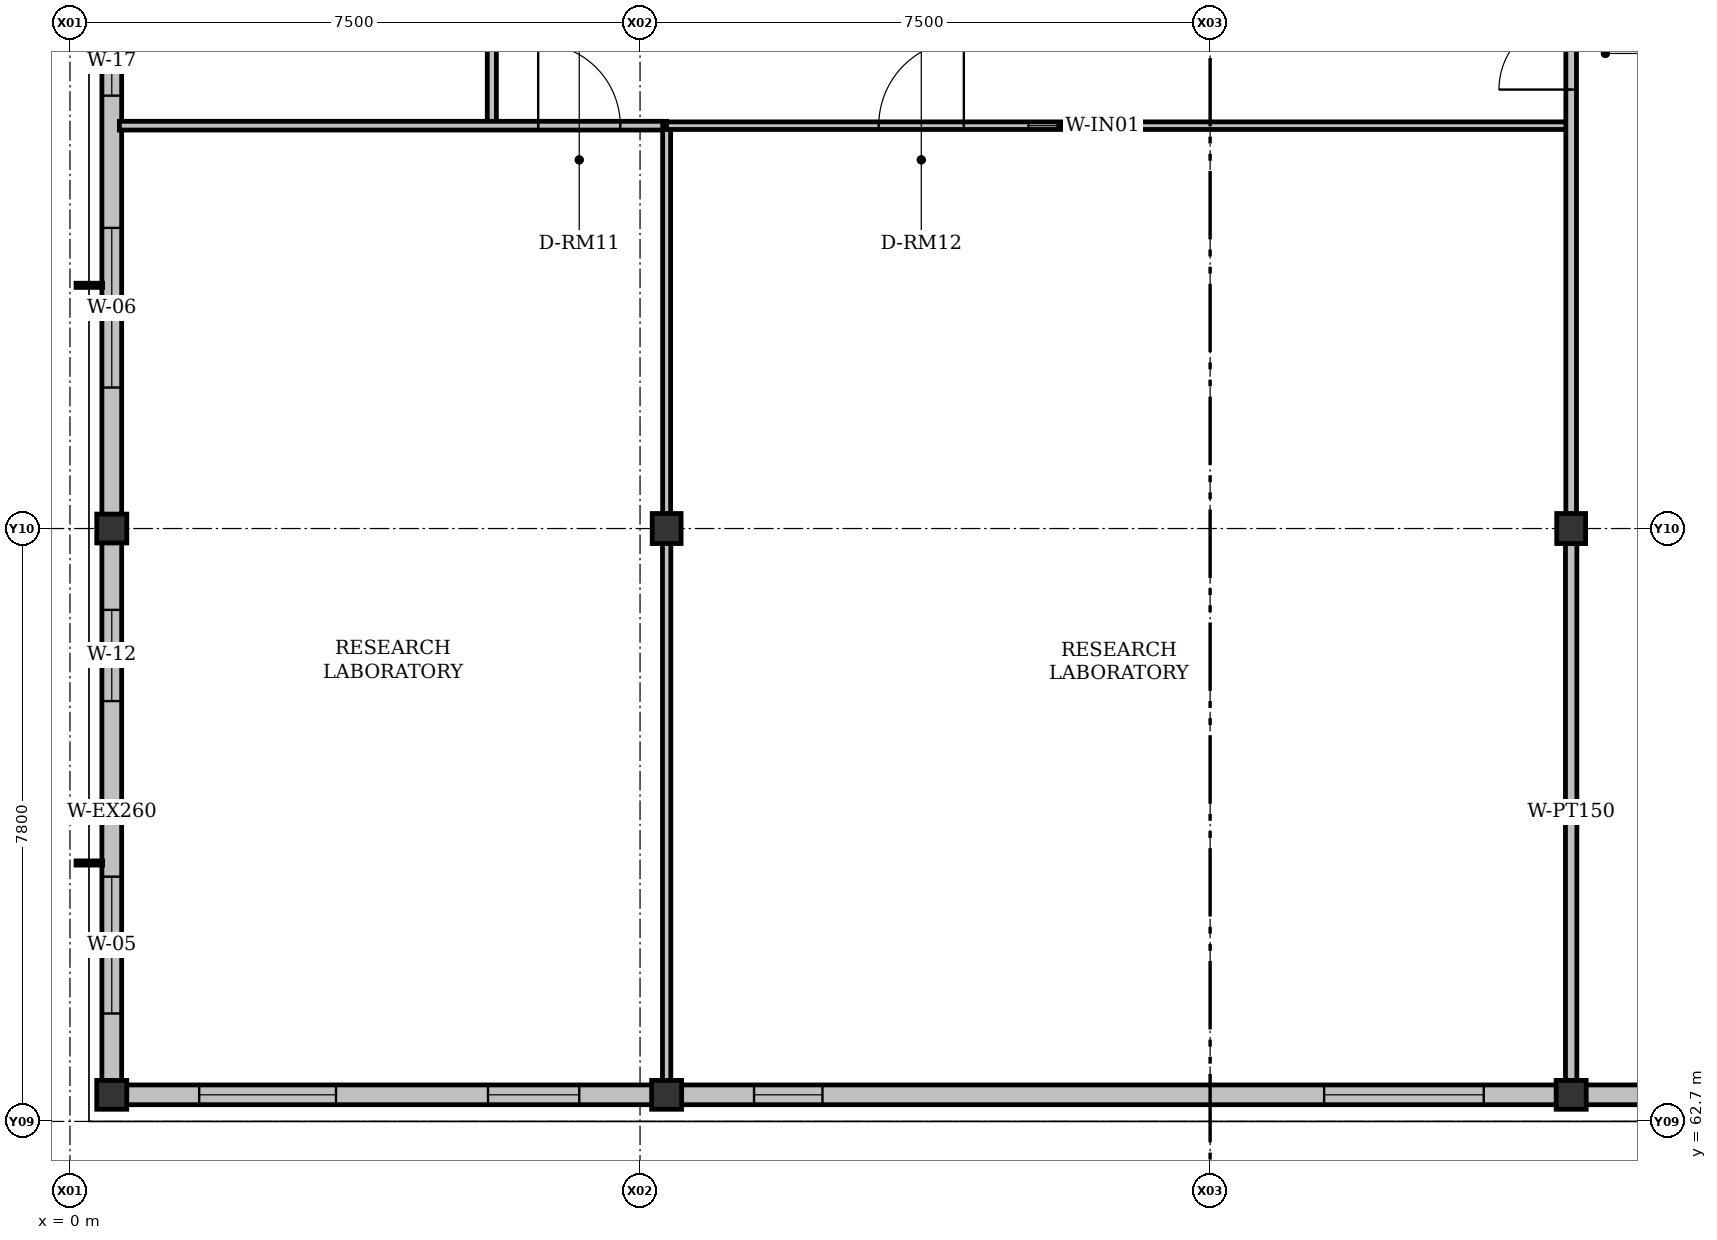
"""IFC4 building model, lengths in metres.
Left out: names, types, materials, properties, quantities, classifications, styles, units other than length and angle.
Written with IfcOpenShell. Run it as: python <this file> out.ifc"""

import sys

from ifc_helpers import new_model, si_unit, direction, frame, frame_2d, origin, origin_2d, place, context, subcontext, project, spatial, rectangle, i_section, extrude, element, fill, save


model = new_model("IFC4")
c1 = context("Model", 3, precision=1e-05, world=origin(), true_north=direction((0.0, 1.0)))
c2 = subcontext(c1, "Body", "Model", "MODEL_VIEW")
j1 = project(units=[si_unit("LENGTHUNIT", "METRE"), si_unit("PLANEANGLEUNIT", "RADIAN")], contexts=[c1])
p1 = place(None, origin())
s1 = spatial("IfcSite", under=j1, at=p1, CompositionType="ELEMENT")
p2 = place(p1, origin())
s2 = spatial("IfcBuilding", under=s1, at=p2, CompositionType="ELEMENT")
p3 = place(p2, frame((0.0, 0.0, 18.3)))
s3 = spatial("IfcBuildingStorey", under=s2, at=p3, CompositionType="ELEMENT", Elevation=18.3)
for number, where, z_axis, x_axis in (
    (1, (0.55, 63.05, 0.0), (0.0, 0.0, 1.0), (1.0, 0.0, 0.0)),
    (2, (7.85, 63.05, 0.0), (0.0, 0.0, 1.0), (1.0, 0.0, 0.0)),
    (3, (19.75, 63.05, 0.0), (0.0, 0.0, 1.0), (1.0, 0.0, 0.0)),
    (4, (0.55, 70.5, 0.0), (0.0, 0.0, 1.0), (1.0, 0.0, 0.0)),
    (5, (7.85, 70.5, 0.0), (0.0, 0.0, 1.0), (0.0, 1.0, 0.0)),
    (6, (19.75, 70.5, 0.0), (0.0, 0.0, 1.0), (0.0, 1.0, 0.0)),
):
    element("IfcColumn", number, at=place(p3, frame(where, z_axis=z_axis, x_axis=x_axis)), inside=s3, PredefinedType="COLUMN", context=c2, shape_type="SweptSolid", body=[
        extrude(i_section(OverallWidth=0.395, OverallDepth=0.38, WebThickness=0.019, FlangeThickness=0.03, FilletRadius=0.015, at=origin_2d()), origin(), (0.0, 0.0, 1.0), 4.2),
    ])
p4 = place(p3, frame((0.55, 63.05, 0.0), z_axis=(0.0, 0.0, 1.0), x_axis=(0.0, 1.0, 0.0)))
e7 = element("IfcWall", 7, at=p4, inside=s3, PredefinedType="SOLIDWALL", context=c2, shape_type="SweptSolid", body=[
    extrude(rectangle(XDim=7.45, YDim=0.26, at=frame_2d((3.725, 0.0))), origin(), (0.0, 0.0, 1.0), 3.577),
])
p5 = place(p4, frame((1.07, 0.0, 0.92)))
e8 = element("IfcOpeningElement", 8, at=p5, cuts=e7, PredefinedType="OPENING", context=c2, shape_type="SweptSolid", body=[
    extrude(rectangle(XDim=1.8, YDim=1.4, at=frame_2d((0.9, 0.7))), frame((0.0, 0.13, 0.0), z_axis=(0.0, -1.0, 0.0), x_axis=(1.0, 0.0, 0.0)), (0.0, 0.0, 1.0), 0.26),
])
p6 = place(p4, frame((5.18, 0.0, 0.92)))
e9 = element("IfcOpeningElement", 9, at=p6, cuts=e7, PredefinedType="OPENING", context=c2, shape_type="SweptSolid", body=[
    extrude(rectangle(XDim=1.2, YDim=1.7, at=frame_2d((0.6, 0.85))), frame((0.0, 0.13, 0.0), z_axis=(0.0, -1.0, 0.0), x_axis=(1.0, 0.0, 0.0)), (0.0, 0.0, 1.0), 0.26),
])
p7 = place(p3, frame((0.55, 70.5, 0.0), z_axis=(0.0, 0.0, 1.0), x_axis=(0.0, 1.0, 0.0)))
e10 = element("IfcWall", 10, at=p7, inside=s3, PredefinedType="SOLIDWALL", context=c2, shape_type="SweptSolid", body=[
    extrude(rectangle(XDim=7.5, YDim=0.26, at=frame_2d((3.75, 0.0))), origin(), (0.0, 0.0, 1.0), 3.577),
])
p8 = place(p7, frame((1.855, 0.0, 0.92)))
e11 = element("IfcOpeningElement", 11, at=p8, cuts=e10, PredefinedType="OPENING", context=c2, shape_type="SweptSolid", body=[
    extrude(rectangle(XDim=2.1, YDim=1.4, at=frame_2d((1.05, 0.7))), frame((0.0, 0.13, 0.0), z_axis=(0.0, -1.0, 0.0), x_axis=(1.0, 0.0, 0.0)), (0.0, 0.0, 1.0), 0.26),
])
p9 = place(p7, frame((5.695, 0.0, 0.92)))
e12 = element("IfcOpeningElement", 12, at=p9, cuts=e10, PredefinedType="OPENING", context=c2, shape_type="SweptSolid", body=[
    extrude(rectangle(XDim=0.9, YDim=1.3, at=frame_2d((0.45, 0.65))), frame((0.0, 0.13, 0.0), z_axis=(0.0, -1.0, 0.0), x_axis=(1.0, 0.0, 0.0)), (0.0, 0.0, 1.0), 0.26),
])
p10 = place(p3, frame((7.85, 63.05, 0.0), z_axis=(0.0, 0.0, 1.0), x_axis=(-1.0, 0.0, 0.0)))
e13 = element("IfcWall", 13, at=p10, inside=s3, PredefinedType="SOLIDWALL", context=c2, shape_type="SweptSolid", body=[
    extrude(rectangle(XDim=7.3, YDim=0.26, at=frame_2d((3.65, 0.0))), origin(), (0.0, 0.0, 1.0), 3.577),
])
p11 = place(p10, frame((1.15, 0.0, 0.92)))
e14 = element("IfcOpeningElement", 14, at=p11, cuts=e13, PredefinedType="OPENING", context=c2, shape_type="SweptSolid", body=[
    extrude(rectangle(XDim=1.2, YDim=1.55, at=frame_2d((0.6, 0.775))), frame((0.0, 0.13, 0.0), z_axis=(0.0, -1.0, 0.0), x_axis=(1.0, 0.0, 0.0)), (0.0, 0.0, 1.0), 0.26),
])
p12 = place(p10, frame((4.35, 0.0, 0.92)))
e15 = element("IfcOpeningElement", 15, at=p12, cuts=e13, PredefinedType="OPENING", context=c2, shape_type="SweptSolid", body=[
    extrude(rectangle(XDim=1.8, YDim=1.7, at=frame_2d((0.9, 0.85))), frame((0.0, 0.13, 0.0), z_axis=(0.0, -1.0, 0.0), x_axis=(1.0, 0.0, 0.0)), (0.0, 0.0, 1.0), 0.26),
])
p13 = place(p3, frame((19.75, 63.05, 0.0), z_axis=(0.0, 0.0, 1.0), x_axis=(-1.0, 0.0, 0.0)))
e16 = element("IfcWall", 16, at=p13, inside=s3, PredefinedType="SOLIDWALL", context=c2, shape_type="SweptSolid", body=[
    extrude(rectangle(XDim=11.9, YDim=0.26, at=frame_2d((5.95, 0.0))), origin(), (0.0, 0.0, 1.0), 3.577),
])
p14 = place(p13, frame((1.15, 0.0, 0.92)))
e17 = element("IfcOpeningElement", 17, at=p14, cuts=e16, PredefinedType="OPENING", context=c2, shape_type="SweptSolid", body=[
    extrude(rectangle(XDim=2.1, YDim=1.55, at=frame_2d((1.05, 0.775))), frame((0.0, 0.13, 0.0), z_axis=(0.0, -1.0, 0.0), x_axis=(1.0, 0.0, 0.0)), (0.0, 0.0, 1.0), 0.26),
])
p15 = place(p13, frame((9.85, 0.0, 0.92)))
e18 = element("IfcOpeningElement", 18, at=p15, cuts=e16, PredefinedType="OPENING", context=c2, shape_type="SweptSolid", body=[
    extrude(rectangle(XDim=0.9, YDim=1.3, at=frame_2d((0.45, 0.65))), frame((0.0, 0.13, 0.0), z_axis=(0.0, -1.0, 0.0), x_axis=(1.0, 0.0, 0.0)), (0.0, 0.0, 1.0), 0.26),
])
p16 = place(p3, frame((27.925, 63.05, 0.0), z_axis=(0.0, 0.0, 1.0), x_axis=(-1.0, 0.0, 0.0)))
e19 = element("IfcWall", 19, at=p16, inside=s3, PredefinedType="SOLIDWALL", context=c2, shape_type="SweptSolid", body=[
    extrude(rectangle(XDim=8.175, YDim=0.26, at=frame_2d((4.087, 0.0))), origin(), (0.0, 0.0, 1.0), 2.79),
])
p17 = place(p16, frame((1.15, 0.0, 0.92)))
e20 = element("IfcOpeningElement", 20, at=p17, cuts=e19, PredefinedType="OPENING", context=c2, shape_type="SweptSolid", body=[
    extrude(rectangle(XDim=1.8, YDim=1.7, at=frame_2d((0.9, 0.85))), frame((0.0, 0.13, 0.0), z_axis=(0.0, -1.0, 0.0), x_axis=(1.0, 0.0, 0.0)), (0.0, 0.0, 1.0), 0.26),
])
p18 = place(p16, frame((5.825, 0.0, 0.92)))
e21 = element("IfcOpeningElement", 21, at=p18, cuts=e19, PredefinedType="OPENING", context=c2, shape_type="SweptSolid", body=[
    extrude(rectangle(XDim=1.2, YDim=1.4, at=frame_2d((0.6, 0.7))), frame((0.0, 0.13, 0.0), z_axis=(0.0, -1.0, 0.0), x_axis=(1.0, 0.0, 0.0)), (0.0, 0.0, 1.0), 0.26),
])
p19 = place(p3, frame((5.55, 75.8, 0.0), z_axis=(0.0, 0.0, 1.0), x_axis=(0.0, 1.0, 0.0)))
e22 = element("IfcWall", 22, at=p19, inside=s3, PredefinedType="PARTITIONING", context=c2, shape_type="SweptSolid", body=[
    extrude(rectangle(XDim=16.6, YDim=0.12, at=frame_2d((8.3, 0.0))), origin(), (0.0, 0.0, 1.0), 3.451),
])
p20 = place(p19, frame((7.76, 0.0, 0.0)))
e23 = element("IfcOpeningElement", 23, at=p20, cuts=e22, PredefinedType="OPENING", context=c2, shape_type="SweptSolid", body=[
    extrude(rectangle(XDim=1.08, YDim=2.1, at=frame_2d((0.54, 1.05))), frame((0.0, 0.06, 0.0), z_axis=(0.0, -1.0, 0.0), x_axis=(1.0, 0.0, 0.0)), (0.0, 0.0, 1.0), 0.12),
])
p21 = place(p19, frame((9.69, 0.0, 0.92)))
e24 = element("IfcOpeningElement", 24, at=p21, cuts=e22, PredefinedType="OPENING", context=c2, shape_type="SweptSolid", body=[
    extrude(rectangle(XDim=1.15, YDim=1.3, at=frame_2d((0.575, 0.65))), frame((0.0, 0.06, 0.0), z_axis=(0.0, -1.0, 0.0), x_axis=(1.0, 0.0, 0.0)), (0.0, 0.0, 1.0), 0.12),
])
p22 = place(p3, frame((0.65, 75.8, 0.0), z_axis=(0.0, 0.0, 1.0), x_axis=(1.0, 0.0, 0.0)))
e25 = element("IfcWall", 25, at=p22, inside=s3, PredefinedType="PARTITIONING", context=c2, shape_type="SweptSolid", body=[
    extrude(rectangle(XDim=7.2, YDim=0.115, at=frame_2d((3.6, 0.0))), origin(), (0.0, 0.0, 1.0), 3.527),
])
p23 = place(p22, frame((5.51, 0.0, 0.0)))
e26 = element("IfcOpeningElement", 26, at=p23, cuts=e25, PredefinedType="OPENING", context=c2, shape_type="SweptSolid", body=[
    extrude(rectangle(XDim=1.08, YDim=2.15, at=frame_2d((0.54, 1.075))), frame((0.0, 0.058, 0.0), z_axis=(0.0, -1.0, 0.0), x_axis=(1.0, 0.0, 0.0)), (0.0, 0.0, 1.0), 0.115),
])
p24 = place(p3, frame((7.85, 63.235, 0.0), z_axis=(0.0, 0.0, 1.0), x_axis=(0.0, 1.0, 0.0)))
e27 = element("IfcWall", 27, at=p24, inside=s3, PredefinedType="PARTITIONING", context=c2, shape_type="SweptSolid", body=[
    extrude(rectangle(XDim=7.073, YDim=0.11, at=frame_2d((3.536, 0.0))), origin(), (0.0, 0.0, 1.0), 3.527),
])
p25 = place(p3, frame((7.85, 70.692, 0.0), z_axis=(0.0, 0.0, 1.0), x_axis=(0.0, 1.0, 0.0)))
e28 = element("IfcWall", 28, at=p25, inside=s3, PredefinedType="PARTITIONING", context=c2, shape_type="SweptSolid", body=[
    extrude(rectangle(XDim=5.108, YDim=0.105, at=frame_2d((2.554, 0.0))), origin(), (0.0, 0.0, 1.0), 3.527),
])
p26 = place(p3, frame((7.85, 75.8, 0.0), z_axis=(0.0, 0.0, 1.0), x_axis=(1.0, 0.0, 0.0)))
e29 = element("IfcWall", 29, at=p26, inside=s3, PredefinedType="PARTITIONING", context=c2, shape_type="SweptSolid", body=[
    extrude(rectangle(XDim=11.9, YDim=0.1, at=frame_2d((5.95, 0.0))), origin(), (0.0, 0.0, 1.0), 3.527),
])
p27 = place(p26, frame((2.79, 0.0, 0.0)))
e30 = element("IfcOpeningElement", 30, at=p27, cuts=e29, PredefinedType="OPENING", context=c2, shape_type="SweptSolid", body=[
    extrude(rectangle(XDim=1.12, YDim=2.15, at=frame_2d((0.56, 1.075))), frame((0.0, 0.05, 0.0), z_axis=(0.0, -1.0, 0.0), x_axis=(1.0, 0.0, 0.0)), (0.0, 0.0, 1.0), 0.1),
])
p28 = place(p26, frame((4.76, 0.0, 0.92)))
e31 = element("IfcOpeningElement", 31, at=p28, cuts=e29, PredefinedType="OPENING", context=c2, shape_type="SweptSolid", body=[
    extrude(rectangle(XDim=0.85, YDim=1.1, at=frame_2d((0.425, 0.55))), frame((0.0, 0.05, 0.0), z_axis=(0.0, -1.0, 0.0), x_axis=(1.0, 0.0, 0.0)), (0.0, 0.0, 1.0), 0.1),
])
p29 = place(p3, frame((19.75, 63.235, 0.0), z_axis=(0.0, 0.0, 1.0), x_axis=(0.0, 1.0, 0.0)))
e32 = element("IfcWall", 32, at=p29, inside=s3, PredefinedType="PARTITIONING", context=c2, shape_type="SweptSolid", body=[
    extrude(rectangle(XDim=7.073, YDim=0.15, at=frame_2d((3.536, 0.0))), origin(), (0.0, 0.0, 1.0), 3.527),
])
p30 = place(p3, frame((19.75, 70.692, 0.0), z_axis=(0.0, 0.0, 1.0), x_axis=(0.0, 1.0, 0.0)))
e33 = element("IfcWall", 33, at=p30, inside=s3, PredefinedType="PARTITIONING", context=c2, shape_type="SweptSolid", body=[
    extrude(rectangle(XDim=7.123, YDim=0.14, at=frame_2d((3.561, 0.0))), origin(), (0.0, 0.0, 1.0), 3.527),
])
p31 = place(p30, frame((5.583, 0.0, 0.0)))
e34 = element("IfcOpeningElement", 34, at=p31, cuts=e33, PredefinedType="OPENING", context=c2, shape_type="SweptSolid", body=[
    extrude(rectangle(XDim=0.95, YDim=2.2, at=frame_2d((0.475, 1.1))), frame((0.0, 0.07, 0.0), z_axis=(0.0, -1.0, 0.0), x_axis=(1.0, 0.0, 0.0)), (0.0, 0.0, 1.0), 0.14),
])
p32 = place(p5, origin())
e35 = element("IfcWindow", 35, at=p32, inside=s3, PartitioningType="DOUBLE_PANEL_VERTICAL", PredefinedType="WINDOW", context=c2, shape_type="SweptSolid", body=[
    extrude(rectangle(XDim=1.8, YDim=1.4, at=frame_2d((0.9, 0.7))), frame((0.0, 0.03, 0.0), z_axis=(0.0, -1.0, 0.0), x_axis=(1.0, 0.0, 0.0)), (0.0, 0.0, 1.0), 0.06),
])
fill(e8, e35)
p33 = place(p6, origin())
e36 = element("IfcWindow", 36, at=p33, inside=s3, PartitioningType="SINGLE_PANEL", PredefinedType="WINDOW", context=c2, shape_type="SweptSolid", body=[
    extrude(rectangle(XDim=1.2, YDim=1.7, at=frame_2d((0.6, 0.85))), frame((0.0, 0.03, 0.0), z_axis=(0.0, -1.0, 0.0), x_axis=(1.0, 0.0, 0.0)), (0.0, 0.0, 1.0), 0.06),
])
fill(e9, e36)
p34 = place(p8, origin())
e37 = element("IfcWindow", 37, at=p34, inside=s3, PartitioningType="DOUBLE_PANEL_VERTICAL", PredefinedType="WINDOW", context=c2, shape_type="SweptSolid", body=[
    extrude(rectangle(XDim=2.1, YDim=1.4, at=frame_2d((1.05, 0.7))), frame((0.0, 0.03, 0.0), z_axis=(0.0, -1.0, 0.0), x_axis=(1.0, 0.0, 0.0)), (0.0, 0.0, 1.0), 0.06),
])
fill(e11, e37)
p35 = place(p9, origin())
e38 = element("IfcWindow", 38, at=p35, inside=s3, PartitioningType="SINGLE_PANEL", PredefinedType="WINDOW", context=c2, shape_type="SweptSolid", body=[
    extrude(rectangle(XDim=0.9, YDim=1.3, at=frame_2d((0.45, 0.65))), frame((0.0, 0.03, 0.0), z_axis=(0.0, -1.0, 0.0), x_axis=(1.0, 0.0, 0.0)), (0.0, 0.0, 1.0), 0.06),
])
fill(e12, e38)
p36 = place(p11, origin())
e39 = element("IfcWindow", 39, at=p36, inside=s3, PartitioningType="SINGLE_PANEL", PredefinedType="WINDOW", context=c2, shape_type="SweptSolid", body=[
    extrude(rectangle(XDim=1.2, YDim=1.55, at=frame_2d((0.6, 0.775))), frame((0.0, 0.03, 0.0), z_axis=(0.0, -1.0, 0.0), x_axis=(1.0, 0.0, 0.0)), (0.0, 0.0, 1.0), 0.06),
])
fill(e14, e39)
p37 = place(p12, origin())
e40 = element("IfcWindow", 40, at=p37, inside=s3, PartitioningType="DOUBLE_PANEL_VERTICAL", PredefinedType="WINDOW", context=c2, shape_type="SweptSolid", body=[
    extrude(rectangle(XDim=1.8, YDim=1.7, at=frame_2d((0.9, 0.85))), frame((0.0, 0.03, 0.0), z_axis=(0.0, -1.0, 0.0), x_axis=(1.0, 0.0, 0.0)), (0.0, 0.0, 1.0), 0.06),
])
fill(e15, e40)
p38 = place(p14, origin())
e41 = element("IfcWindow", 41, at=p38, inside=s3, PartitioningType="DOUBLE_PANEL_VERTICAL", PredefinedType="WINDOW", context=c2, shape_type="SweptSolid", body=[
    extrude(rectangle(XDim=2.1, YDim=1.55, at=frame_2d((1.05, 0.775))), frame((0.0, 0.03, 0.0), z_axis=(0.0, -1.0, 0.0), x_axis=(1.0, 0.0, 0.0)), (0.0, 0.0, 1.0), 0.06),
])
fill(e17, e41)
p39 = place(p15, origin())
e42 = element("IfcWindow", 42, at=p39, inside=s3, PartitioningType="SINGLE_PANEL", PredefinedType="WINDOW", context=c2, shape_type="SweptSolid", body=[
    extrude(rectangle(XDim=0.9, YDim=1.3, at=frame_2d((0.45, 0.65))), frame((0.0, 0.03, 0.0), z_axis=(0.0, -1.0, 0.0), x_axis=(1.0, 0.0, 0.0)), (0.0, 0.0, 1.0), 0.06),
])
fill(e18, e42)
p40 = place(p23, origin())
e43 = element("IfcDoor", 43, at=p40, inside=s3, OperationType="SINGLE_SWING_LEFT", PredefinedType="DOOR", context=c2, shape_type="SweptSolid", body=[
    extrude(rectangle(XDim=1.08, YDim=2.15, at=frame_2d((0.54, 1.075))), frame((0.0, 0.025, 0.0), z_axis=(0.0, -1.0, 0.0), x_axis=(1.0, 0.0, 0.0)), (0.0, 0.0, 1.0), 0.05),
])
fill(e26, e43)
p41 = place(p27, origin())
e44 = element("IfcDoor", 44, at=p41, inside=s3, OperationType="SINGLE_SWING_RIGHT", PredefinedType="DOOR", context=c2, shape_type="SweptSolid", body=[
    extrude(rectangle(XDim=1.12, YDim=2.15, at=frame_2d((0.56, 1.075))), frame((0.0, 0.025, 0.0), z_axis=(0.0, -1.0, 0.0), x_axis=(1.0, 0.0, 0.0)), (0.0, 0.0, 1.0), 0.05),
])
fill(e30, e44)
p42 = place(p28, origin())
e45 = element("IfcWindow", 45, at=p42, inside=s3, PartitioningType="SINGLE_PANEL", PredefinedType="WINDOW", context=c2, shape_type="SweptSolid", body=[
    extrude(rectangle(XDim=0.85, YDim=1.1, at=frame_2d((0.425, 0.55))), frame((0.0, 0.03, 0.0), z_axis=(0.0, -1.0, 0.0), x_axis=(1.0, 0.0, 0.0)), (0.0, 0.0, 1.0), 0.06),
])
fill(e31, e45)
p43 = place(p31, origin())
e46 = element("IfcDoor", 46, at=p43, inside=s3, OperationType="SINGLE_SWING_LEFT", PredefinedType="DOOR", context=c2, shape_type="SweptSolid", body=[
    extrude(rectangle(XDim=0.95, YDim=2.2, at=frame_2d((0.475, 1.1))), frame((0.0, 0.025, 0.0), z_axis=(0.0, -1.0, 0.0), x_axis=(1.0, 0.0, 0.0)), (0.0, 0.0, 1.0), 0.05),
])
fill(e34, e46)
save(model, sys.argv[1])
